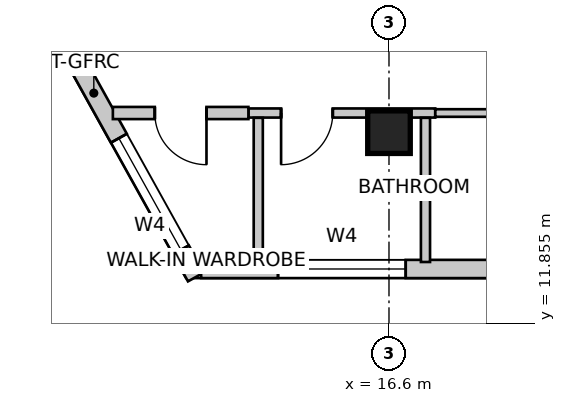
"""IFC4 building model, lengths in metres.
Left out: names, types, materials, properties, quantities, classifications, styles, units other than length and angle.
Written with IfcOpenShell. Run it as: python <this file> out.ifc"""

import sys

from ifc_helpers import new_model, si_unit, direction, frame, frame_2d, origin, origin_2d, place, context, subcontext, project, spatial, rectangle, extrude, source, transform, mapped, element, fill, save


model = new_model("IFC4")
c1 = context("Model", 3, precision=1e-05, world=origin(), true_north=direction((0.0, 1.0)))
c2 = subcontext(c1, "Body", "Model", "MODEL_VIEW")
j1 = project(units=[si_unit("LENGTHUNIT", "METRE"), si_unit("PLANEANGLEUNIT", "RADIAN")], contexts=[c1])
p1 = place(None, origin())
s1 = spatial("IfcSite", under=j1, at=p1, CompositionType="ELEMENT")
p2 = place(p1, origin())
s2 = spatial("IfcBuilding", under=s1, at=p2, CompositionType="ELEMENT")
p3 = place(p2, frame((0.0, 0.0, 200.9)))
s3 = spatial("IfcBuildingStorey", under=s2, at=p3, CompositionType="ELEMENT", Elevation=200.9)
m1 = source(origin(), c2, "Body", "SweptSolid", [
    extrude(rectangle(XDim=0.7, YDim=0.7, at=origin_2d()), origin(), (0.0, 0.0, 1.0), 3.5),
])
p4 = place(p3, frame((16.6, 15.0, 0.0), z_axis=(0.0, 0.0, 1.0), x_axis=(1.0, 0.0, 0.0)))
e1 = element("IfcColumn", 1, at=p4, inside=s3, PredefinedType="COLUMN", context=c2, shape_type="MappedRepresentation", body=[
    mapped(m1, transform((0.0, 0.0, 0.0), scale=1.0)),
])
p5 = place(p3, frame((11.333, 16.384, 0.0), z_axis=(0.0, 0.0, 1.0), x_axis=(0.485633305139, -0.874162623852, 0.0)))
e2 = element("IfcWall", 2, at=p5, inside=s3, PredefinedType="SOLIDWALL", context=c2, shape_type="SweptSolid", body=[
    extrude(rectangle(XDim=4.307, YDim=0.3, at=frame_2d((2.153, 0.0))), origin(), (0.0, 0.0, 1.0), 3.25),
])
m2 = source(origin(), c2, "Body", "SweptSolid", [
    extrude(rectangle(XDim=2.1, YDim=2.0, at=frame_2d((1.05, 1.0))), frame((0.0, 0.16, 0.0), z_axis=(0.0, -1.0, 0.0), x_axis=(1.0, 0.0, 0.0)), (0.0, 0.0, 1.0), 0.32),
])
p6 = place(p5, frame((1.697, 0.0, 0.85)))
e3 = element("IfcOpeningElement", 3, at=p6, cuts=e2, PredefinedType="OPENING", context=c2, shape_type="MappedRepresentation", body=[
    mapped(m2, transform((0.0, 0.0, 0.0), scale=1.0)),
])
p7 = place(p3, frame((13.51, 12.75, 0.0), z_axis=(0.0, 0.0, 1.0), x_axis=(1.0, 0.0, 0.0)))
e4 = element("IfcWall", 4, at=p7, inside=s3, PredefinedType="SOLIDWALL", context=c2, shape_type="SweptSolid", body=[
    extrude(rectangle(XDim=10.642, YDim=0.3, at=frame_2d((5.321, 0.0))), origin(), (0.0, 0.0, 1.0), 3.25),
])
p8 = place(p7, frame((1.265, 0.0, 0.85)))
e5 = element("IfcOpeningElement", 5, at=p8, cuts=e4, PredefinedType="OPENING", context=c2, shape_type="MappedRepresentation", body=[
    mapped(m2, transform((0.0, 0.0, 0.0), scale=1.0)),
])
m3 = source(origin(), c2, "Body", "SweptSolid", [
    extrude(rectangle(XDim=2.4, YDim=2.2, at=frame_2d((1.2, 1.1))), frame((0.0, 0.16, 0.0), z_axis=(0.0, -1.0, 0.0), x_axis=(1.0, 0.0, 0.0)), (0.0, 0.0, 1.0), 0.32),
])
p9 = place(p7, frame((5.916, 0.0, 0.85)))
e6 = element("IfcOpeningElement", 6, at=p9, cuts=e4, PredefinedType="OPENING", context=c2, shape_type="MappedRepresentation", body=[
    mapped(m3, transform((0.0, 0.0, 0.0), scale=1.0)),
])
p10 = place(p3, frame((17.36, 15.315, 0.0), z_axis=(0.0, 0.0, 1.0), x_axis=(-1.0, 0.0, 0.0)))
e7 = element("IfcWall", 7, at=p10, inside=s3, PredefinedType="PARTITIONING", context=c2, shape_type="SweptSolid", body=[
    extrude(rectangle(XDim=3.07, YDim=0.15, at=frame_2d((1.535, 0.0))), origin(), (0.0, 0.0, 1.0), 2.822),
])
m4 = source(origin(), c2, "Body", "SweptSolid", [
    extrude(rectangle(XDim=0.85, YDim=2.15, at=frame_2d((0.425, 1.075))), frame((0.0, 0.085, 0.0), z_axis=(0.0, -1.0, 0.0), x_axis=(1.0, 0.0, 0.0)), (0.0, 0.0, 1.0), 0.17),
])
p11 = place(p10, frame((1.685, 0.0, 0.0)))
e8 = element("IfcOpeningElement", 8, at=p11, cuts=e7, PredefinedType="OPENING", context=c2, shape_type="MappedRepresentation", body=[
    mapped(m4, transform((0.0, 0.0, 0.0), scale=1.0)),
])
p12 = place(p3, frame((14.288, 15.315, 0.0), z_axis=(0.0, 0.0, 1.0), x_axis=(-1.0, 0.0, 0.0)))
e9 = element("IfcWall", 9, at=p12, inside=s3, PredefinedType="PARTITIONING", context=c2, shape_type="SweptSolid", body=[
    extrude(rectangle(XDim=2.229, YDim=0.2, at=frame_2d((1.115, 0.0))), origin(), (0.0, 0.0, 1.0), 3.25),
])
m5 = source(origin(), c2, "Body", "SweptSolid", [
    extrude(rectangle(XDim=0.85, YDim=2.15, at=frame_2d((0.425, 1.075))), frame((0.0, 0.11, 0.0), z_axis=(0.0, -1.0, 0.0), x_axis=(1.0, 0.0, 0.0)), (0.0, 0.0, 1.0), 0.22),
])
p13 = place(p12, frame((0.69, 0.0, 0.0)))
e10 = element("IfcOpeningElement", 10, at=p13, cuts=e9, PredefinedType="OPENING", context=c2, shape_type="MappedRepresentation", body=[
    mapped(m5, transform((0.0, 0.0, 0.0), scale=1.0)),
])
p14 = place(p3, frame((20.192, 15.315, 0.0), z_axis=(0.0, 0.0, 1.0), x_axis=(-1.0, 0.0, 0.0)))
e11 = element("IfcWall", 11, at=p14, inside=s3, PredefinedType="PARTITIONING", context=c2, shape_type="SweptSolid", body=[
    extrude(rectangle(XDim=2.83, YDim=0.125, at=frame_2d((1.415, 0.0))), origin(), (0.0, 0.0, 1.0), 3.25),
])
m6 = source(origin(), c2, "Body", "SweptSolid", [
    extrude(rectangle(XDim=0.9, YDim=2.15, at=frame_2d((0.45, 1.075))), frame((0.0, 0.073, 0.0), z_axis=(0.0, -1.0, 0.0), x_axis=(1.0, 0.0, 0.0)), (0.0, 0.0, 1.0), 0.145),
])
p15 = place(p14, frame((0.903, 0.0, 0.0)))
e12 = element("IfcOpeningElement", 12, at=p15, cuts=e11, PredefinedType="OPENING", context=c2, shape_type="MappedRepresentation", body=[
    mapped(m6, transform((0.0, 0.0, 0.0), scale=1.0)),
])
p16 = place(p3, frame((14.45, 12.865, 0.0), z_axis=(0.0, 0.0, 1.0), x_axis=(0.0, 1.0, 0.0)))
e13 = element("IfcWall", 13, at=p16, inside=s3, PredefinedType="PARTITIONING", context=c2, shape_type="SweptSolid", body=[
    extrude(rectangle(XDim=2.371, YDim=0.15, at=frame_2d((1.186, 0.0))), origin(), (0.0, 0.0, 1.0), 3.25),
])
p17 = place(p3, frame((17.2, 15.236, 0.0), z_axis=(0.0, 0.0, 1.0), x_axis=(0.0, -1.0, 0.0)))
e14 = element("IfcWall", 14, at=p17, inside=s3, PredefinedType="PARTITIONING", context=c2, shape_type="SweptSolid", body=[
    extrude(rectangle(XDim=2.371, YDim=0.15, at=frame_2d((1.186, 0.0))), origin(), (0.0, 0.0, 1.0), 2.542),
])
m7 = source(origin(), c2, "Body", "SweptSolid", [
    extrude(rectangle(XDim=2.1, YDim=2.0, at=frame_2d((1.05, 1.0))), frame((0.0, -0.015, 0.0), z_axis=(0.0, -1.0, 0.0), x_axis=(1.0, 0.0, 0.0)), (0.0, 0.0, 1.0), 0.06),
])
p18 = place(p6, origin())
e15 = element("IfcWindow", 15, at=p18, inside=s3, PartitioningType="SINGLE_PANEL", PredefinedType="WINDOW", context=c2, shape_type="MappedRepresentation", body=[
    mapped(m7, transform((0.0, 0.0, 0.0), scale=1.0)),
])
fill(e3, e15)
p19 = place(p8, origin())
e16 = element("IfcWindow", 16, at=p19, inside=s3, PartitioningType="SINGLE_PANEL", PredefinedType="WINDOW", context=c2, shape_type="MappedRepresentation", body=[
    mapped(m7, transform((0.0, 0.0, 0.0), scale=1.0)),
])
fill(e5, e16)
m8 = source(origin(), c2, "Body", "SweptSolid", [
    extrude(rectangle(XDim=0.85, YDim=2.15, at=frame_2d((0.425, 1.075))), frame((0.0, 0.025, 0.0), z_axis=(0.0, -1.0, 0.0), x_axis=(1.0, 0.0, 0.0)), (0.0, 0.0, 1.0), 0.05),
])
p20 = place(p11, origin())
e17 = element("IfcDoor", 17, at=p20, inside=s3, OperationType="SINGLE_SWING_RIGHT", PredefinedType="DOOR", context=c2, shape_type="MappedRepresentation", body=[
    mapped(m8, transform((0.0, 0.0, 0.0), scale=1.0)),
])
fill(e8, e17)
p21 = place(p13, origin())
e18 = element("IfcDoor", 18, at=p21, inside=s3, OperationType="SINGLE_SWING_LEFT", PredefinedType="DOOR", context=c2, shape_type="MappedRepresentation", body=[
    mapped(m8, transform((0.0, 0.0, 0.0), scale=1.0)),
])
fill(e10, e18)
save(model, sys.argv[1])
